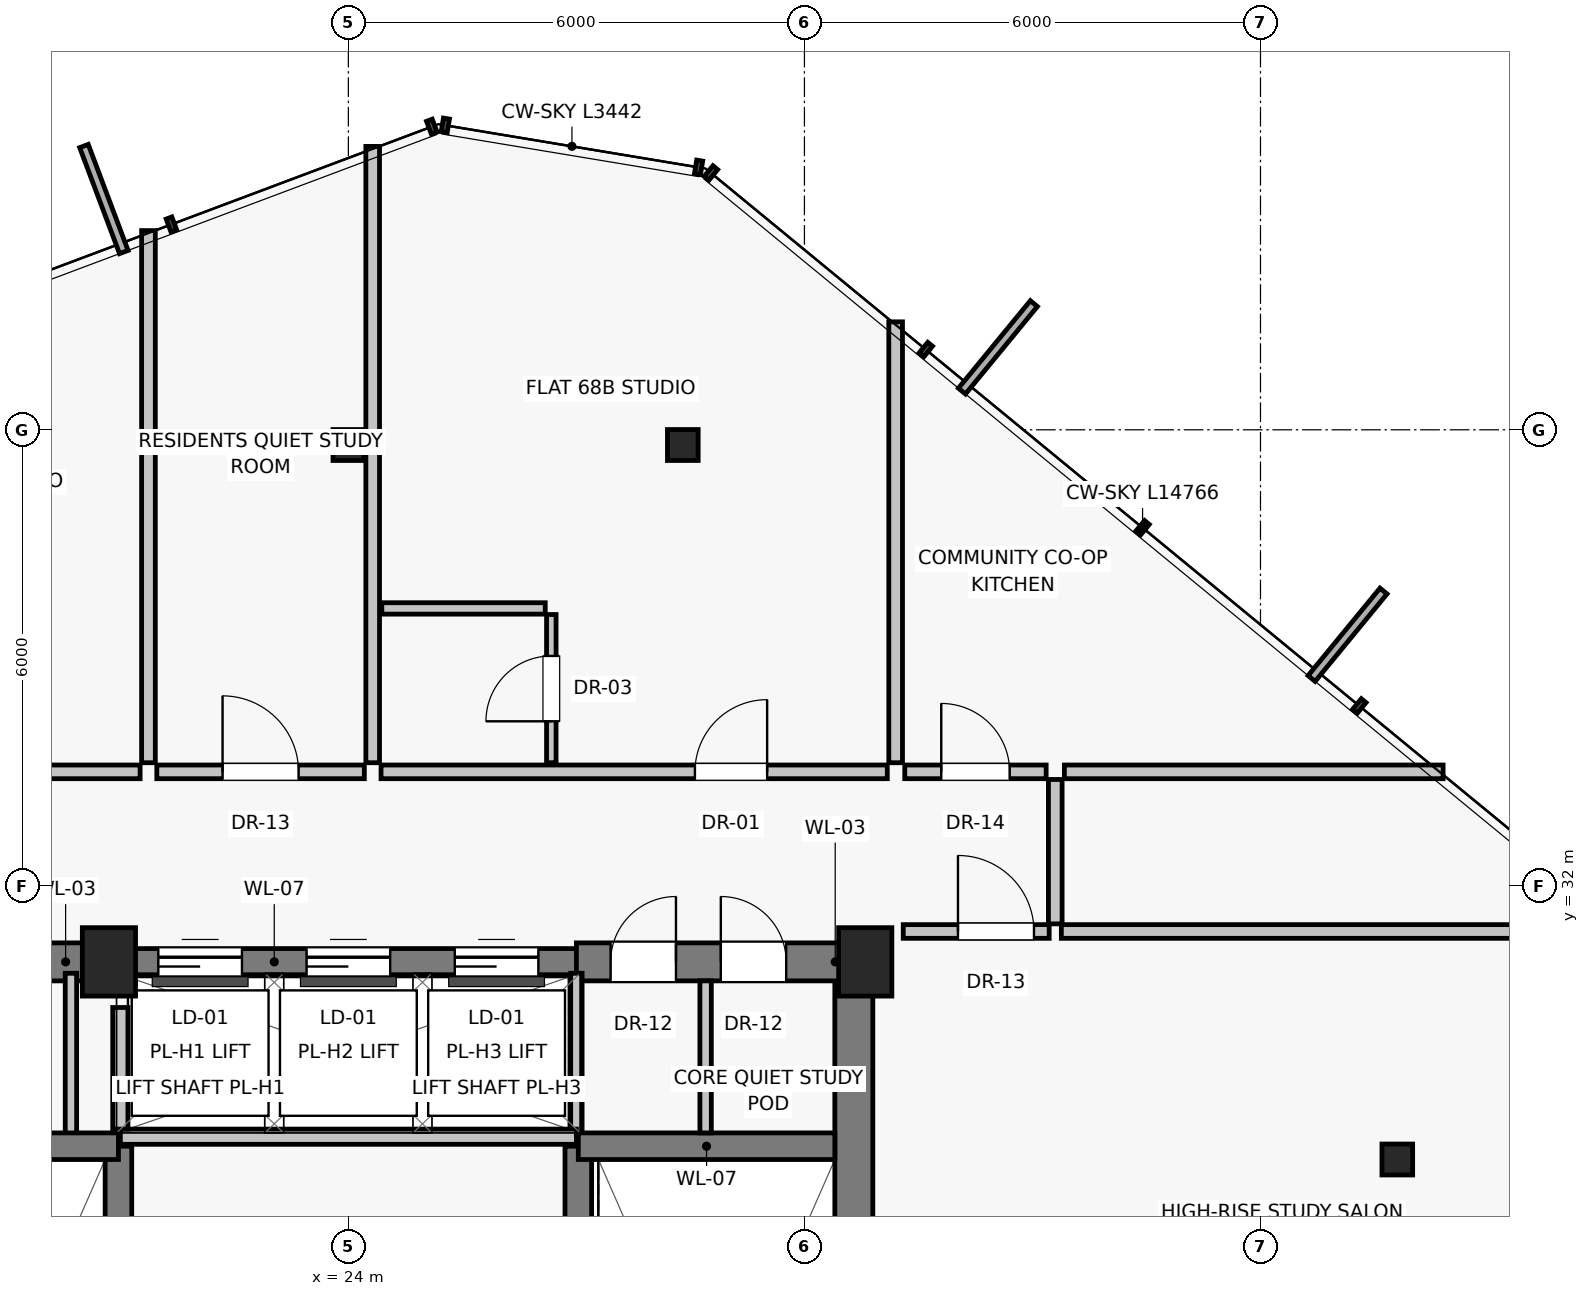
"""IFC4 building model, lengths in metres.
Left out: names, types, materials, properties, quantities, classifications, styles, units other than length and angle.
Written with IfcOpenShell. Run it as: python <this file> out.ifc"""

import sys

from ifc_helpers import new_model, si_unit, direction, frame, frame_2d, origin, origin_2d, place, context, subcontext, project, spatial, rectangle, i_section, extrude, source, transform, mapped, element, fill, save


model = new_model("IFC4")
c1 = context("Model", 3, precision=1e-05, world=origin(), true_north=direction((0.0, 1.0)))
c2 = subcontext(c1, "Body", "Model", "MODEL_VIEW")
j1 = project(units=[si_unit("LENGTHUNIT", "METRE"), si_unit("PLANEANGLEUNIT", "RADIAN")], contexts=[c1])
p1 = place(None, origin())
s1 = spatial("IfcSite", under=j1, at=p1, CompositionType="ELEMENT")
p2 = place(p1, origin())
s2 = spatial("IfcBuilding", under=s1, at=p2, CompositionType="ELEMENT")
p3 = place(p2, frame((0.0, 0.0, 240.65)))
s3 = spatial("IfcBuildingStorey", under=s2, at=p3, CompositionType="ELEMENT", Elevation=240.65)
for number, where, z_axis, x_axis in (
    (1, (20.85, 31.0, 0.0), (0.0, 0.0, 1.0), (1.0, 0.0, 0.0)),
    (2, (30.8, 31.0, 0.0), (0.0, 0.0, 1.0), (1.0, 0.0, 0.0)),
):
    element("IfcColumn", number, at=place(p3, frame(where, z_axis=z_axis, x_axis=x_axis)), inside=s3, PredefinedType="PILASTER", context=c2, shape_type="SweptSolid", body=[
        extrude(rectangle(XDim=0.7, YDim=0.9, at=origin_2d()), origin(), (0.0, 0.0, 1.0), 4.1),
    ])
for number, where, z_axis, x_axis in (
    (3, (37.8, 28.4, 0.0), (0.0, 0.0, 1.0), (1.0, 0.0, 0.0)),
    (4, (28.4, 37.8, 0.0), (0.0, 0.0, 1.0), (1.0, 0.0, 0.0)),
    (5, (24.0, 37.8, 0.0), (0.0, 0.0, 1.0), (1.0, 0.0, 0.0)),
):
    element("IfcColumn", number, at=place(p3, frame(where, z_axis=z_axis, x_axis=x_axis)), inside=s3, PredefinedType="COLUMN", context=c2, shape_type="SweptSolid", body=[
        extrude(i_section(OverallWidth=0.404, OverallDepth=0.407, WebThickness=0.025, FlangeThickness=0.04, at=origin_2d()), origin(), (0.0, 0.0, 1.0), 4.1),
    ])
p4 = place(p3, frame((30.65, 16.8, 0.0), z_axis=(0.0, 0.0, 1.0), x_axis=(0.0, 1.0, 0.0)))
e6 = element("IfcWall", 6, at=p4, inside=s3, PredefinedType="SHEAR", context=c2, shape_type="SweptSolid", body=[
    extrude(rectangle(XDim=14.2, YDim=0.5, at=frame_2d((7.1, 0.0))), origin(), (0.0, 0.0, 1.0), 3.865),
])
p5 = place(p3, frame((17.2, 31.0, 0.0), z_axis=(0.0, 0.0, 1.0), x_axis=(1.0, 0.0, 0.0)))
e7 = element("IfcWall", 7, at=p5, inside=s3, PredefinedType="SHEAR", context=c2, shape_type="SweptSolid", body=[
    extrude(rectangle(XDim=3.8, YDim=0.5, at=frame_2d((1.9, 0.0))), origin(), (0.0, 0.0, 1.0), 3.865),
])
p6 = place(p5, frame((1.25, 0.0, 0.0)))
e8 = element("IfcOpeningElement", 8, at=p6, cuts=e7, PredefinedType="OPENING", context=c2, shape_type="SweptSolid", body=[
    extrude(rectangle(XDim=0.86, YDim=2.01, at=frame_2d((0.43, 1.005))), frame((0.0, 0.26, 0.0), z_axis=(0.0, -1.0, 0.0), x_axis=(1.0, 0.0, 0.0)), (0.0, 0.0, 1.0), 0.52),
])
p7 = place(p3, frame((21.0, 31.0, 0.0), z_axis=(0.0, 0.0, 1.0), x_axis=(1.0, 0.0, 0.0)))
e9 = element("IfcWall", 9, at=p7, inside=s3, PredefinedType="SHEAR", context=c2, shape_type="SweptSolid", body=[
    extrude(rectangle(XDim=6.0, YDim=0.35, at=frame_2d((3.0, 0.0))), origin(), (0.0, 0.0, 1.0), 3.865),
])
p8 = place(p7, frame((0.5, 0.0, 0.0)))
e10 = element("IfcOpeningElement", 10, at=p8, cuts=e9, PredefinedType="OPENING", context=c2, shape_type="SweptSolid", body=[
    extrude(rectangle(XDim=1.1, YDim=2.08, at=frame_2d((0.55, 1.04))), frame((0.0, 0.185, 0.0), z_axis=(0.0, -1.0, 0.0), x_axis=(1.0, 0.0, 0.0)), (0.0, 0.0, 1.0), 0.37),
])
p9 = place(p7, frame((2.45, 0.0, 0.0)))
e11 = element("IfcOpeningElement", 11, at=p9, cuts=e9, PredefinedType="OPENING", context=c2, shape_type="SweptSolid", body=[
    extrude(rectangle(XDim=1.1, YDim=2.08, at=frame_2d((0.55, 1.04))), frame((0.0, 0.185, 0.0), z_axis=(0.0, -1.0, 0.0), x_axis=(1.0, 0.0, 0.0)), (0.0, 0.0, 1.0), 0.37),
])
p10 = place(p7, frame((4.4, 0.0, 0.0)))
e12 = element("IfcOpeningElement", 12, at=p10, cuts=e9, PredefinedType="OPENING", context=c2, shape_type="SweptSolid", body=[
    extrude(rectangle(XDim=1.1, YDim=2.08, at=frame_2d((0.55, 1.04))), frame((0.0, 0.185, 0.0), z_axis=(0.0, -1.0, 0.0), x_axis=(1.0, 0.0, 0.0)), (0.0, 0.0, 1.0), 0.37),
])
p11 = place(p3, frame((27.0, 31.0, 0.0), z_axis=(0.0, 0.0, 1.0), x_axis=(1.0, 0.0, 0.0)))
e13 = element("IfcWall", 13, at=p11, inside=s3, PredefinedType="SHEAR", context=c2, shape_type="SweptSolid", body=[
    extrude(rectangle(XDim=3.8, YDim=0.5, at=frame_2d((1.9, 0.0))), origin(), (0.0, 0.0, 1.0), 3.865),
])
p12 = place(p11, frame((0.45, 0.0, 0.0)))
e14 = element("IfcOpeningElement", 14, at=p12, cuts=e13, PredefinedType="OPENING", context=c2, shape_type="SweptSolid", body=[
    extrude(rectangle(XDim=0.86, YDim=2.01, at=frame_2d((0.43, 1.005))), frame((0.0, 0.26, 0.0), z_axis=(0.0, -1.0, 0.0), x_axis=(1.0, 0.0, 0.0)), (0.0, 0.0, 1.0), 0.52),
])
p13 = place(p11, frame((1.9, 0.0, 0.0)))
e15 = element("IfcOpeningElement", 15, at=p13, cuts=e13, PredefinedType="OPENING", context=c2, shape_type="SweptSolid", body=[
    extrude(rectangle(XDim=0.86, YDim=2.01, at=frame_2d((0.43, 1.005))), frame((0.0, 0.26, 0.0), z_axis=(0.0, -1.0, 0.0), x_axis=(1.0, 0.0, 0.0)), (0.0, 0.0, 1.0), 0.52),
])
for number, where, z_axis, x_axis in (
    (16, (20.35, 28.65, 0.0), (0.0, 0.0, 1.0), (0.0, 1.0, 0.0)),
    (17, (27.0, 28.65, 0.0), (0.0, 0.0, 1.0), (0.0, 1.0, 0.0)),
):
    element("IfcWall", number, at=place(p3, frame(where, z_axis=z_axis, x_axis=x_axis)), inside=s3, PredefinedType="PARTITIONING", context=c2, shape_type="SweptSolid", body=[
        extrude(rectangle(XDim=2.2, YDim=0.15, at=frame_2d((1.1, 0.0))), origin(), (0.0, 0.0, 1.0), 3.865),
    ])
for number, where, z_axis, x_axis in (
    (18, (20.975, 19.8, 0.0), (0.0, 0.0, 1.0), (0.0, 1.0, 0.0)),
    (19, (27.025, 19.8, 0.0), (0.0, 0.0, 1.0), (0.0, 1.0, 0.0)),
):
    element("IfcWall", number, at=place(p3, frame(where, z_axis=z_axis, x_axis=x_axis)), inside=s3, PredefinedType="SHEAR", context=c2, shape_type="SweptSolid", body=[
        extrude(rectangle(XDim=8.775, YDim=0.35, at=frame_2d((4.387, 0.0))), origin(), (0.0, 0.0, 1.0), 3.865),
    ])
for number, where, z_axis, x_axis in (
    (20, (17.6, 28.575, 0.0), (0.0, 0.0, 1.0), (1.0, 0.0, 0.0)),
    (21, (27.025, 28.575, 0.0), (0.0, 0.0, 1.0), (1.0, 0.0, 0.0)),
):
    element("IfcWall", number, at=place(p3, frame(where, z_axis=z_axis, x_axis=x_axis)), inside=s3, PredefinedType="SHEAR", context=c2, shape_type="SweptSolid", body=[
        extrude(rectangle(XDim=3.375, YDim=0.35, at=frame_2d((1.688, 0.0))), origin(), (0.0, 0.0, 1.0), 3.865),
    ])
p14 = place(p3, frame((21.0, 28.7, 0.0), z_axis=(0.0, 0.0, 1.0), x_axis=(1.0, 0.0, 0.0)))
e22 = element("IfcWall", 22, at=p14, inside=s3, PredefinedType="SOLIDWALL", context=c2, shape_type="SweptSolid", body=[
    extrude(rectangle(XDim=6.0, YDim=0.2, at=frame_2d((3.0, 0.0))), origin(), (0.0, 0.0, 1.0), 3.865),
])
p15 = place(p3, frame((21.0, 28.8, 0.0), z_axis=(0.0, 0.0, 1.0), x_axis=(0.0, 1.0, 0.0)))
e23 = element("IfcWall", 23, at=p15, inside=s3, PredefinedType="SOLIDWALL", context=c2, shape_type="SweptSolid", body=[
    extrude(rectangle(XDim=1.6, YDim=0.2, at=frame_2d((0.8, 0.0))), origin(), (0.0, 0.0, 1.0), 3.865),
])
p16 = place(p3, frame((28.7, 28.75, 0.0), z_axis=(0.0, 0.0, 1.0), x_axis=(0.0, 1.0, 0.0)))
e24 = element("IfcWall", 24, at=p16, inside=s3, PredefinedType="PARTITIONING", context=c2, shape_type="SweptSolid", body=[
    extrude(rectangle(XDim=2.0, YDim=0.15, at=frame_2d((1.0, 0.0))), origin(), (0.0, 0.0, 1.0), 3.865),
])
p17 = place(p3, frame((31.2, 33.62, 0.0), z_axis=(0.0, 0.0, 1.0), x_axis=(0.0, 1.0, 0.0)))
e25 = element("IfcWall", 25, at=p17, inside=s3, PredefinedType="PARTITIONING", context=c2, shape_type="SweptSolid", body=[
    extrude(rectangle(XDim=5.8, YDim=0.18, at=frame_2d((2.9, 0.0))), origin(), (0.0, 0.0, 1.0), 3.865),
])
p18 = place(p3, frame((21.48, 33.5, 0.0), z_axis=(0.0, 0.0, 1.0), x_axis=(1.0, 0.0, 0.0)))
e26 = element("IfcWall", 26, at=p18, inside=s3, PredefinedType="PARTITIONING", context=c2, shape_type="SweptSolid", body=[
    extrude(rectangle(XDim=2.73, YDim=0.18, at=frame_2d((1.365, 0.0))), origin(), (0.0, 0.0, 1.0), 3.865),
])
p19 = place(p18, frame((0.865, 0.0, 0.0)))
e27 = element("IfcOpeningElement", 27, at=p19, cuts=e26, PredefinedType="OPENING", context=c2, shape_type="SweptSolid", body=[
    extrude(rectangle(XDim=1.0, YDim=2.01, at=frame_2d((0.5, 1.005))), frame((0.0, 0.1, 0.0), z_axis=(0.0, -1.0, 0.0), x_axis=(1.0, 0.0, 0.0)), (0.0, 0.0, 1.0), 0.2),
])
p20 = place(p3, frame((21.37, 33.62, 0.0), z_axis=(0.0, 0.0, 1.0), x_axis=(0.0, 1.0, 0.0)))
e28 = element("IfcWall", 28, at=p20, inside=s3, PredefinedType="PARTITIONING", context=c2, shape_type="SweptSolid", body=[
    extrude(rectangle(XDim=7.0, YDim=0.18, at=frame_2d((3.5, 0.0))), origin(), (0.0, 0.0, 1.0), 3.865),
])
p21 = place(p3, frame((15.31, 33.5, 0.0), z_axis=(0.0, 0.0, 1.0), x_axis=(1.0, 0.0, 0.0)))
e29 = element("IfcWall", 29, at=p21, inside=s3, PredefinedType="PARTITIONING", context=c2, shape_type="SweptSolid", body=[
    extrude(rectangle(XDim=5.95, YDim=0.18, at=frame_2d((2.975, 0.0))), origin(), (0.0, 0.0, 1.0), 3.865),
])
p22 = place(p21, frame((3.604, 0.0, 0.0)))
e30 = element("IfcOpeningElement", 30, at=p22, cuts=e29, PredefinedType="OPENING", context=c2, shape_type="SweptSolid", body=[
    extrude(rectangle(XDim=0.95, YDim=2.02, at=frame_2d((0.475, 1.01))), frame((0.0, 0.1, 0.0), z_axis=(0.0, -1.0, 0.0), x_axis=(1.0, 0.0, 0.0)), (0.0, 0.0, 1.0), 0.2),
])
p23 = place(p3, frame((24.32, 33.62, 0.0), z_axis=(0.0, 0.0, 1.0), x_axis=(0.0, 1.0, 0.0)))
e31 = element("IfcWall", 31, at=p23, inside=s3, PredefinedType="PARTITIONING", context=c2, shape_type="SweptSolid", body=[
    extrude(rectangle(XDim=8.108, YDim=0.18, at=frame_2d((4.054, 0.0))), origin(), (0.0, 0.0, 1.0), 3.865),
])
p24 = place(p3, frame((24.43, 33.5, 0.0), z_axis=(0.0, 0.0, 1.0), x_axis=(1.0, 0.0, 0.0)))
e32 = element("IfcWall", 32, at=p24, inside=s3, PredefinedType="PARTITIONING", context=c2, shape_type="SweptSolid", body=[
    extrude(rectangle(XDim=6.66, YDim=0.18, at=frame_2d((3.33, 0.0))), origin(), (0.0, 0.0, 1.0), 3.865),
])
p25 = place(p24, frame((4.129, 0.0, 0.0)))
e33 = element("IfcOpeningElement", 33, at=p25, cuts=e32, PredefinedType="OPENING", context=c2, shape_type="SweptSolid", body=[
    extrude(rectangle(XDim=0.95, YDim=2.02, at=frame_2d((0.475, 1.01))), frame((0.0, 0.1, 0.0), z_axis=(0.0, -1.0, 0.0), x_axis=(1.0, 0.0, 0.0)), (0.0, 0.0, 1.0), 0.2),
])
p26 = place(p3, frame((26.67, 33.62, 0.0), z_axis=(0.0, 0.0, 1.0), x_axis=(0.0, 1.0, 0.0)))
e34 = element("IfcWall", 34, at=p26, inside=s3, PredefinedType="PARTITIONING", context=c2, shape_type="SweptSolid", body=[
    extrude(rectangle(XDim=1.95, YDim=0.125, at=frame_2d((0.975, 0.0))), origin(), (0.0, 0.0, 1.0), 3.865),
])
p27 = place(p26, frame((0.545, 0.0, 0.0)))
e35 = element("IfcOpeningElement", 35, at=p27, cuts=e34, PredefinedType="OPENING", context=c2, shape_type="SweptSolid", body=[
    extrude(rectangle(XDim=0.86, YDim=2.01, at=frame_2d((0.43, 1.005))), frame((0.0, 0.073, 0.0), z_axis=(0.0, -1.0, 0.0), x_axis=(1.0, 0.0, 0.0)), (0.0, 0.0, 1.0), 0.145),
])
p28 = place(p3, frame((24.44, 35.65, 0.0), z_axis=(0.0, 0.0, 1.0), x_axis=(1.0, 0.0, 0.0)))
e36 = element("IfcWall", 36, at=p28, inside=s3, PredefinedType="PARTITIONING", context=c2, shape_type="SweptSolid", body=[
    extrude(rectangle(XDim=2.15, YDim=0.15, at=frame_2d((1.075, 0.0))), origin(), (0.0, 0.0, 1.0), 3.865),
])
p29 = place(p3, frame((33.3, 31.5, 0.0), z_axis=(0.0, 0.0, 1.0), x_axis=(0.0, 1.0, 0.0)))
e37 = element("IfcWall", 37, at=p29, inside=s3, PredefinedType="PARTITIONING", context=c2, shape_type="SweptSolid", body=[
    extrude(rectangle(XDim=1.9, YDim=0.18, at=frame_2d((0.95, 0.0))), origin(), (0.0, 0.0, 1.0), 3.865),
])
p30 = place(p3, frame((31.3, 31.4, 0.0), z_axis=(0.0, 0.0, 1.0), x_axis=(1.0, 0.0, 0.0)))
e38 = element("IfcWall", 38, at=p30, inside=s3, PredefinedType="PARTITIONING", context=c2, shape_type="SweptSolid", body=[
    extrude(rectangle(XDim=1.92, YDim=0.18, at=frame_2d((0.96, 0.0))), origin(), (0.0, 0.0, 1.0), 3.865),
])
p31 = place(p30, frame((0.72, 0.0, 0.0)))
e39 = element("IfcOpeningElement", 39, at=p31, cuts=e38, PredefinedType="OPENING", context=c2, shape_type="SweptSolid", body=[
    extrude(rectangle(XDim=1.0, YDim=2.01, at=frame_2d((0.5, 1.005))), frame((0.0, 0.1, 0.0), z_axis=(0.0, -1.0, 0.0), x_axis=(1.0, 0.0, 0.0)), (0.0, 0.0, 1.0), 0.2),
])
p32 = place(p3, frame((33.38, 31.4, 0.0), z_axis=(0.0, 0.0, 1.0), x_axis=(1.0, 0.0, 0.0)))
e40 = element("IfcWall", 40, at=p32, inside=s3, PredefinedType="PARTITIONING", context=c2, shape_type="SweptSolid", body=[
    extrude(rectangle(XDim=7.07, YDim=0.18, at=frame_2d((3.535, 0.0))), origin(), (0.0, 0.0, 1.0), 3.865),
])
p33 = place(p3, frame((33.42, 33.5, 0.0), z_axis=(0.0, 0.0, 1.0), x_axis=(1.0, 0.0, 0.0)))
e41 = element("IfcWall", 41, at=p33, inside=s3, PredefinedType="PARTITIONING", context=c2, shape_type="SweptSolid", body=[
    extrude(rectangle(XDim=4.983, YDim=0.18, at=frame_2d((2.491, 0.0))), origin(), (0.0, 0.0, 1.0), 3.865),
])
p34 = place(p3, frame((31.32, 33.5, 0.0), z_axis=(0.0, 0.0, 1.0), x_axis=(1.0, 0.0, 0.0)))
e42 = element("IfcWall", 42, at=p34, inside=s3, PredefinedType="PARTITIONING", context=c2, shape_type="SweptSolid", body=[
    extrude(rectangle(XDim=1.86, YDim=0.18, at=frame_2d((0.93, 0.0))), origin(), (0.0, 0.0, 1.0), 3.865),
])
p35 = place(p34, frame((0.48, 0.0, 0.0)))
e43 = element("IfcOpeningElement", 43, at=p35, cuts=e42, PredefinedType="OPENING", context=c2, shape_type="SweptSolid", body=[
    extrude(rectangle(XDim=0.9, YDim=2.01, at=frame_2d((0.45, 1.005))), frame((0.0, 0.1, 0.0), z_axis=(0.0, -1.0, 0.0), x_axis=(1.0, 0.0, 0.0)), (0.0, 0.0, 1.0), 0.2),
])
m1 = source(origin(), c2, "Body", "SweptSolid", [
    extrude(rectangle(XDim=1.1, YDim=2.08, at=frame_2d((0.55, 1.04))), frame((0.0, 0.025, 0.0), z_axis=(0.0, -1.0, 0.0), x_axis=(1.0, 0.0, 0.0)), (0.0, 0.0, 1.0), 0.05),
])
p36 = place(p8, origin())
e44 = element("IfcDoor", 44, at=p36, inside=s3, OperationType="SLIDING_TO_LEFT", PredefinedType="DOOR", context=c2, shape_type="MappedRepresentation", body=[
    mapped(m1, transform((0.0, 0.0, 0.0), scale=1.0)),
])
fill(e10, e44)
p37 = place(p9, origin())
e45 = element("IfcDoor", 45, at=p37, inside=s3, OperationType="SLIDING_TO_LEFT", PredefinedType="DOOR", context=c2, shape_type="MappedRepresentation", body=[
    mapped(m1, transform((0.0, 0.0, 0.0), scale=1.0)),
])
fill(e11, e45)
p38 = place(p10, origin())
e46 = element("IfcDoor", 46, at=p38, inside=s3, OperationType="SLIDING_TO_LEFT", PredefinedType="DOOR", context=c2, shape_type="MappedRepresentation", body=[
    mapped(m1, transform((0.0, 0.0, 0.0), scale=1.0)),
])
fill(e12, e46)
m2 = source(origin(), c2, "Body", "SweptSolid", [
    extrude(rectangle(XDim=0.86, YDim=2.01, at=frame_2d((0.43, 1.005))), frame((0.0, 0.025, 0.0), z_axis=(0.0, -1.0, 0.0), x_axis=(1.0, 0.0, 0.0)), (0.0, 0.0, 1.0), 0.05),
])
p39 = place(p12, origin())
e47 = element("IfcDoor", 47, at=p39, inside=s3, OperationType="SINGLE_SWING_RIGHT", PredefinedType="DOOR", context=c2, shape_type="MappedRepresentation", body=[
    mapped(m2, transform((0.0, 0.0, 0.0), scale=1.0)),
])
fill(e14, e47)
p40 = place(p13, origin())
e48 = element("IfcDoor", 48, at=p40, inside=s3, OperationType="SINGLE_SWING_LEFT", PredefinedType="DOOR", context=c2, shape_type="MappedRepresentation", body=[
    mapped(m2, transform((0.0, 0.0, 0.0), scale=1.0)),
])
fill(e15, e48)
m3 = source(origin(), c2, "Body", "SweptSolid", [
    extrude(rectangle(XDim=1.0, YDim=2.01, at=frame_2d((0.5, 1.005))), frame((0.0, 0.025, 0.0), z_axis=(0.0, -1.0, 0.0), x_axis=(1.0, 0.0, 0.0)), (0.0, 0.0, 1.0), 0.05),
])
p41 = place(p19, origin())
e49 = element("IfcDoor", 49, at=p41, inside=s3, OperationType="SINGLE_SWING_LEFT", PredefinedType="DOOR", context=c2, shape_type="MappedRepresentation", body=[
    mapped(m3, transform((0.0, 0.0, 0.0), scale=1.0)),
])
fill(e27, e49)
m4 = source(origin(), c2, "Body", "SweptSolid", [
    extrude(rectangle(XDim=0.95, YDim=2.02, at=frame_2d((0.475, 1.01))), frame((0.0, 0.025, 0.0), z_axis=(0.0, -1.0, 0.0), x_axis=(1.0, 0.0, 0.0)), (0.0, 0.0, 1.0), 0.05),
])
p42 = place(p25, origin())
e50 = element("IfcDoor", 50, at=p42, inside=s3, OperationType="SINGLE_SWING_RIGHT", PredefinedType="DOOR", context=c2, shape_type="MappedRepresentation", body=[
    mapped(m4, transform((0.0, 0.0, 0.0), scale=1.0)),
])
fill(e33, e50)
p43 = place(p27, origin())
e51 = element("IfcDoor", 51, at=p43, inside=s3, OperationType="SINGLE_SWING_LEFT", PredefinedType="DOOR", context=c2, shape_type="MappedRepresentation", body=[
    mapped(m2, transform((0.0, 0.0, 0.0), scale=1.0)),
])
fill(e35, e51)
p44 = place(p31, origin())
e52 = element("IfcDoor", 52, at=p44, inside=s3, OperationType="SINGLE_SWING_LEFT", PredefinedType="DOOR", context=c2, shape_type="MappedRepresentation", body=[
    mapped(m3, transform((0.0, 0.0, 0.0), scale=1.0)),
])
fill(e39, e52)
m5 = source(origin(), c2, "Body", "SweptSolid", [
    extrude(rectangle(XDim=0.9, YDim=2.01, at=frame_2d((0.45, 1.005))), frame((0.0, 0.025, 0.0), z_axis=(0.0, -1.0, 0.0), x_axis=(1.0, 0.0, 0.0)), (0.0, 0.0, 1.0), 0.05),
])
p45 = place(p35, origin())
e53 = element("IfcDoor", 53, at=p45, inside=s3, OperationType="SINGLE_SWING_LEFT", PredefinedType="DOOR", context=c2, shape_type="MappedRepresentation", body=[
    mapped(m5, transform((0.0, 0.0, 0.0), scale=1.0)),
])
fill(e43, e53)
save(model, sys.argv[1])
